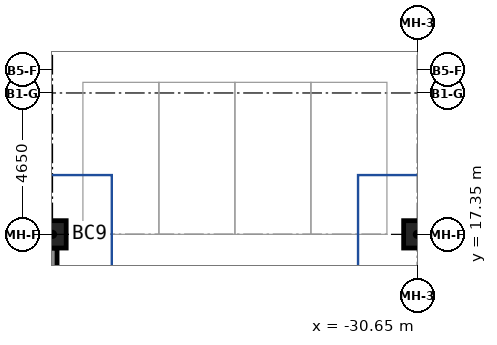
"""IFC4 building model, lengths in metres.
Left out: names, types, materials, properties, quantities, classifications, styles, units other than length and angle.
Written with IfcOpenShell. Run it as: python <this file> out.ifc"""

import sys

from ifc_helpers import new_model, si_unit, direction, frame, frame_2d, origin, origin_2d, place, context, subcontext, project, spatial, rectangle, extrude, source, transform, mapped, element, save


model = new_model("IFC4")
c1 = context("Model", 3, precision=1e-05, world=origin(), true_north=direction((0.0, 1.0)))
c2 = subcontext(c1, "Body", "Model", "MODEL_VIEW")
j1 = project(units=[si_unit("LENGTHUNIT", "METRE"), si_unit("PLANEANGLEUNIT", "RADIAN")], contexts=[c1])
p1 = place(None, origin())
s1 = spatial("IfcSite", under=j1, at=p1, CompositionType="ELEMENT")
p2 = place(p1, origin())
s2 = spatial("IfcBuilding", under=s1, at=p2, CompositionType="ELEMENT")
p3 = place(p2, frame((0.0, 0.0, -9.0)))
s3 = spatial("IfcBuildingStorey", under=s2, at=p3, CompositionType="ELEMENT", Elevation=-9.0)
m1 = source(origin(), c2, "Body", "SweptSolid", [
    extrude(rectangle(XDim=11.1, YDim=0.3, at=frame_2d((5.55, 0.0))), origin(), (0.0, 0.0, 1.0), 4.1),
])
p4 = place(p3, frame((-42.65, 5.8, 0.0), z_axis=(0.0, 0.0, 1.0), x_axis=(0.0, 1.0, 0.0)))
e1 = element("IfcWall", 1, at=p4, inside=s3, PredefinedType="SHEAR", context=c2, shape_type="MappedRepresentation", body=[
    mapped(m1, transform((0.0, 0.0, 0.0))),
])
m2 = source(origin(), c2, "Body", "SweptSolid", [
    extrude(rectangle(XDim=0.9, YDim=0.9, at=origin_2d()), origin(), (0.0, 0.0, 1.0), 4.5),
])
for number, where, z_axis, x_axis in (
    (2, (-42.65, 17.35, 0.0), (0.0, 0.0, 1.0), (1.0, 0.0, 0.0)),
    (3, (-30.65, 17.35, 0.0), (0.0, 0.0, 1.0), (1.0, 0.0, 0.0)),
):
    element("IfcColumn", number, at=place(p3, frame(where, z_axis=z_axis, x_axis=x_axis)), inside=s3, PredefinedType="COLUMN", context=c2, shape_type="MappedRepresentation", body=[
        mapped(m2, transform((0.0, 0.0, 0.0))),
    ])
save(model, sys.argv[1])
